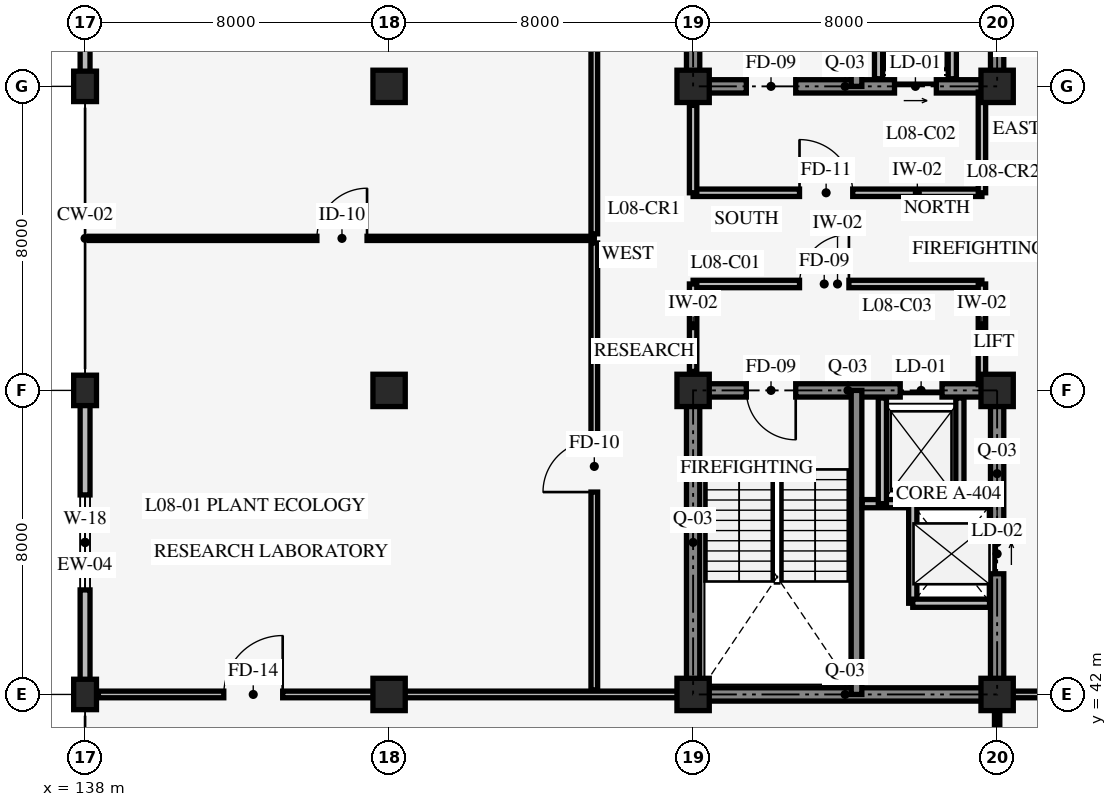
"""IFC4 building model, lengths in metres.
Left out: names, types, materials, properties, quantities, classifications, styles, units other than length and angle.
Written with IfcOpenShell. Run it as: python <this file> out.ifc"""

import sys

from ifc_helpers import new_model, si_unit, direction, frame, frame_2d, origin, origin_2d, place, context, subcontext, project, spatial, rectangle, extrude, element, fill, save


model = new_model("IFC4")
c1 = context("Model", 3, precision=1e-05, world=origin(), true_north=direction((0.0, 1.0)))
c2 = subcontext(c1, "Body", "Model", "MODEL_VIEW")
j1 = project(units=[si_unit("LENGTHUNIT", "METRE"), si_unit("PLANEANGLEUNIT", "RADIAN")], contexts=[c1])
p1 = place(None, origin())
s1 = spatial("IfcSite", under=j1, at=p1, CompositionType="ELEMENT")
p2 = place(p1, origin())
s2 = spatial("IfcBuilding", under=s1, at=p2, CompositionType="ELEMENT")
p3 = place(p2, frame((0.0, 0.0, 31.8)))
s3 = spatial("IfcBuildingStorey", under=s2, at=p3, CompositionType="ELEMENT", Elevation=31.8)
p4 = place(p3, frame((154.0, 42.0, 0.0), z_axis=(0.0, 0.0, 1.0), x_axis=(1.0, 0.0, 0.0)))
e1 = element("IfcWall", 1, at=p4, inside=s3, PredefinedType="SHEAR", context=c2, shape_type="SweptSolid", body=[
    extrude(rectangle(XDim=8.0, YDim=0.35, at=frame_2d((4.0, 0.0))), origin(), (0.0, 0.0, 1.0), 3.95),
])
p5 = place(p3, frame((162.0, 42.0, 0.0), z_axis=(0.0, 0.0, 1.0), x_axis=(0.0, 1.0, 0.0)))
e2 = element("IfcWall", 2, at=p5, inside=s3, PredefinedType="SHEAR", context=c2, shape_type="SweptSolid", body=[
    extrude(rectangle(XDim=8.0, YDim=0.35, at=frame_2d((4.0, 0.0))), origin(), (0.0, 0.0, 1.0), 3.95),
])
p6 = place(p5, frame((3.175, 0.0, 0.0)))
e3 = element("IfcOpeningElement", 3, at=p6, cuts=e2, PredefinedType="OPENING", context=c2, shape_type="SweptSolid", body=[
    extrude(rectangle(XDim=1.05, YDim=2.2, at=frame_2d((0.525, 1.1))), frame((0.0, 0.185, 0.0), z_axis=(0.0, -1.0, 0.0), x_axis=(1.0, 0.0, 0.0)), (0.0, 0.0, 1.0), 0.37),
])
p7 = place(p3, frame((162.0, 50.0, 0.0), z_axis=(0.0, 0.0, 1.0), x_axis=(-1.0, 0.0, 0.0)))
e4 = element("IfcWall", 4, at=p7, inside=s3, PredefinedType="SHEAR", context=c2, shape_type="SweptSolid", body=[
    extrude(rectangle(XDim=8.0, YDim=0.35, at=frame_2d((4.0, 0.0))), origin(), (0.0, 0.0, 1.0), 3.95),
])
p8 = place(p7, frame((5.3, 0.0, 0.0)))
e5 = element("IfcOpeningElement", 5, at=p8, cuts=e4, PredefinedType="OPENING", context=c2, shape_type="SweptSolid", body=[
    extrude(rectangle(XDim=1.3, YDim=2.15, at=frame_2d((0.65, 1.075))), frame((0.0, 0.185, 0.0), z_axis=(0.0, -1.0, 0.0), x_axis=(1.0, 0.0, 0.0)), (0.0, 0.0, 1.0), 0.37),
])
p9 = place(p7, frame((1.45, 0.0, 0.0)))
e6 = element("IfcOpeningElement", 6, at=p9, cuts=e4, PredefinedType="OPENING", context=c2, shape_type="SweptSolid", body=[
    extrude(rectangle(XDim=1.1, YDim=2.2, at=frame_2d((0.55, 1.1))), frame((0.0, 0.185, 0.0), z_axis=(0.0, -1.0, 0.0), x_axis=(1.0, 0.0, 0.0)), (0.0, 0.0, 1.0), 0.37),
])
p10 = place(p3, frame((154.0, 50.0, 0.0), z_axis=(0.0, 0.0, 1.0), x_axis=(0.0, -1.0, 0.0)))
e7 = element("IfcWall", 7, at=p10, inside=s3, PredefinedType="SHEAR", context=c2, shape_type="SweptSolid", body=[
    extrude(rectangle(XDim=8.0, YDim=0.35, at=frame_2d((4.0, 0.0))), origin(), (0.0, 0.0, 1.0), 3.95),
])
p11 = place(p3, frame((158.3, 42.0, 0.0), z_axis=(0.0, 0.0, 1.0), x_axis=(0.0, 1.0, 0.0)))
e8 = element("IfcWall", 8, at=p11, inside=s3, PredefinedType="SHEAR", context=c2, shape_type="SweptSolid", body=[
    extrude(rectangle(XDim=8.0, YDim=0.28, at=frame_2d((4.0, 0.0))), origin(), (0.0, 0.0, 1.0), 3.95),
])
p12 = place(p3, frame((154.0, 58.0, 0.0), z_axis=(0.0, 0.0, 1.0), x_axis=(1.0, 0.0, 0.0)))
e9 = element("IfcWall", 9, at=p12, inside=s3, PredefinedType="SHEAR", context=c2, shape_type="SweptSolid", body=[
    extrude(rectangle(XDim=8.0, YDim=0.35, at=frame_2d((4.0, 0.0))), origin(), (0.0, 0.0, 1.0), 3.95),
])
p13 = place(p12, frame((1.4, 0.0, 0.0)))
e10 = element("IfcOpeningElement", 10, at=p13, cuts=e9, PredefinedType="OPENING", context=c2, shape_type="SweptSolid", body=[
    extrude(rectangle(XDim=1.3, YDim=2.15, at=frame_2d((0.65, 1.075))), frame((0.0, 0.185, 0.0), z_axis=(0.0, -1.0, 0.0), x_axis=(1.0, 0.0, 0.0)), (0.0, 0.0, 1.0), 0.37),
])
p14 = place(p12, frame((5.3, 0.0, 0.0)))
e11 = element("IfcOpeningElement", 11, at=p14, cuts=e9, PredefinedType="OPENING", context=c2, shape_type="SweptSolid", body=[
    extrude(rectangle(XDim=1.1, YDim=2.2, at=frame_2d((0.55, 1.1))), frame((0.0, 0.185, 0.0), z_axis=(0.0, -1.0, 0.0), x_axis=(1.0, 0.0, 0.0)), (0.0, 0.0, 1.0), 0.37),
])
p15 = place(p3, frame((162.0, 58.0, 0.0), z_axis=(0.0, 0.0, 1.0), x_axis=(0.0, 1.0, 0.0)))
e12 = element("IfcWall", 12, at=p15, inside=s3, PredefinedType="SHEAR", context=c2, shape_type="SweptSolid", body=[
    extrude(rectangle(XDim=8.0, YDim=0.35, at=frame_2d((4.0, 0.0))), origin(), (0.0, 0.0, 1.0), 3.95),
])
p16 = place(p15, frame((3.275, 0.0, 0.0)))
e13 = element("IfcOpeningElement", 13, at=p16, cuts=e12, PredefinedType="OPENING", context=c2, shape_type="SweptSolid", body=[
    extrude(rectangle(XDim=1.05, YDim=2.2, at=frame_2d((0.525, 1.1))), frame((0.0, 0.185, 0.0), z_axis=(0.0, -1.0, 0.0), x_axis=(1.0, 0.0, 0.0)), (0.0, 0.0, 1.0), 0.37),
])
p17 = place(p15, frame((5.45, 0.0, 0.0)))
e14 = element("IfcOpeningElement", 14, at=p17, cuts=e12, PredefinedType="OPENING", context=c2, shape_type="SweptSolid", body=[
    extrude(rectangle(XDim=1.4, YDim=2.3, at=frame_2d((0.7, 1.15))), frame((0.0, 0.185, 0.0), z_axis=(0.0, -1.0, 0.0), x_axis=(1.0, 0.0, 0.0)), (0.0, 0.0, 1.0), 0.37),
])
p18 = place(p3, frame((154.0, 66.0, 0.0), z_axis=(0.0, 0.0, 1.0), x_axis=(0.0, -1.0, 0.0)))
e15 = element("IfcWall", 15, at=p18, inside=s3, PredefinedType="SHEAR", context=c2, shape_type="SweptSolid", body=[
    extrude(rectangle(XDim=8.0, YDim=0.35, at=frame_2d((4.0, 0.0))), origin(), (0.0, 0.0, 1.0), 3.95),
])
p19 = place(p3, frame((158.3, 58.0, 0.0), z_axis=(0.0, 0.0, 1.0), x_axis=(0.0, 1.0, 0.0)))
e16 = element("IfcWall", 16, at=p19, inside=s3, PredefinedType="SHEAR", context=c2, shape_type="SweptSolid", body=[
    extrude(rectangle(XDim=8.0, YDim=0.28, at=frame_2d((4.0, 0.0))), origin(), (0.0, 0.0, 1.0), 3.95),
])
for number, where, z_axis, x_axis in (
    (17, (138.0, 42.0, 0.0), (0.0, 0.0, 1.0), (1.0, 0.0, 0.0)),
    (18, (138.0, 50.0, 0.0), (0.0, 0.0, 1.0), (1.0, 0.0, 0.0)),
    (19, (138.0, 58.0, 0.0), (0.0, 0.0, 1.0), (1.0, 0.0, 0.0)),
):
    element("IfcColumn", number, at=place(p3, frame(where, z_axis=z_axis, x_axis=x_axis)), inside=s3, PredefinedType="COLUMN", context=c2, shape_type="SweptSolid", body=[
        extrude(rectangle(XDim=0.6, YDim=0.8, at=origin_2d()), origin(), (0.0, 0.0, 1.0), 4.2),
    ])
for number, where, z_axis, x_axis in (
    (20, (146.0, 42.0, 0.0), (0.0, 0.0, 1.0), (1.0, 0.0, 0.0)),
    (21, (146.0, 50.0, 0.0), (0.0, 0.0, 1.0), (1.0, 0.0, 0.0)),
    (22, (146.0, 58.0, 0.0), (0.0, 0.0, 1.0), (1.0, 0.0, 0.0)),
    (23, (154.0, 42.0, 0.0), (0.0, 0.0, 1.0), (1.0, 0.0, 0.0)),
    (24, (154.0, 50.0, 0.0), (0.0, 0.0, 1.0), (1.0, 0.0, 0.0)),
    (25, (154.0, 58.0, 0.0), (0.0, 0.0, 1.0), (1.0, 0.0, 0.0)),
    (26, (162.0, 42.0, 0.0), (0.0, 0.0, 1.0), (1.0, 0.0, 0.0)),
    (27, (162.0, 50.0, 0.0), (0.0, 0.0, 1.0), (1.0, 0.0, 0.0)),
    (28, (162.0, 58.0, 0.0), (0.0, 0.0, 1.0), (1.0, 0.0, 0.0)),
):
    element("IfcColumn", number, at=place(p3, frame(where, z_axis=z_axis, x_axis=x_axis)), inside=s3, PredefinedType="COLUMN", context=c2, shape_type="SweptSolid", body=[
        extrude(rectangle(XDim=0.85, YDim=0.85, at=origin_2d()), origin(), (0.0, 0.0, 1.0), 4.2),
    ])
p20 = place(p3, frame((138.0, 42.0, 0.0), z_axis=(0.0, 0.0, 1.0), x_axis=(0.0, 1.0, 0.0)))
e29 = element("IfcWall", 29, at=p20, inside=s3, PredefinedType="STANDARD", context=c2, shape_type="SweptSolid", body=[
    extrude(rectangle(XDim=8.0, YDim=0.26, at=frame_2d((4.0, 0.0))), origin(), (0.0, 0.0, 1.0), 3.31),
])
p21 = place(p20, frame((2.75, 0.0, 0.85)))
e30 = element("IfcOpeningElement", 30, at=p21, cuts=e29, PredefinedType="OPENING", context=c2, shape_type="SweptSolid", body=[
    extrude(rectangle(XDim=2.5, YDim=1.8, at=frame_2d((1.25, 0.9))), frame((0.0, 0.14, 0.0), z_axis=(0.0, -1.0, 0.0), x_axis=(1.0, 0.0, 0.0)), (0.0, 0.0, 1.0), 0.28),
])
p22 = place(p3, frame((138.0, 58.0, 0.0), z_axis=(0.0, 0.0, 1.0), x_axis=(0.0, 1.0, 0.0)))
e31 = element("IfcWall", 31, at=p22, inside=s3, PredefinedType="STANDARD", context=c2, shape_type="SweptSolid", body=[
    extrude(rectangle(XDim=8.0, YDim=0.26, at=frame_2d((4.0, 0.0))), origin(), (0.0, 0.0, 1.0), 3.31),
])
p23 = place(p22, frame((2.85, 0.0, 0.85)))
e32 = element("IfcOpeningElement", 32, at=p23, cuts=e31, PredefinedType="OPENING", context=c2, shape_type="SweptSolid", body=[
    extrude(rectangle(XDim=2.3, YDim=1.5, at=frame_2d((1.15, 0.75))), frame((0.0, 0.14, 0.0), z_axis=(0.0, -1.0, 0.0), x_axis=(1.0, 0.0, 0.0)), (0.0, 0.0, 1.0), 0.28),
])
p24 = place(p3, frame((158.45, 47.02, 0.0), z_axis=(0.0, 0.0, 1.0), x_axis=(1.0, 0.0, 0.0)))
e33 = element("IfcWall", 33, at=p24, inside=s3, PredefinedType="STANDARD", context=c2, shape_type="SweptSolid", body=[
    extrude(rectangle(XDim=3.35, YDim=0.215, at=frame_2d((1.675, 0.0))), origin(), (0.0, 0.0, 1.0), 3.9),
])
for number, where, z_axis, x_axis in (
    (34, (158.98, 47.02, 0.0), (0.0, 0.0, 1.0), (0.0, 1.0, 0.0)),
    (35, (161.02, 47.02, 0.0), (0.0, 0.0, 1.0), (0.0, 1.0, 0.0)),
):
    element("IfcWall", number, at=place(p3, frame(where, z_axis=z_axis, x_axis=x_axis)), inside=s3, PredefinedType="STANDARD", context=c2, shape_type="SweptSolid", body=[
        extrude(rectangle(XDim=2.78, YDim=0.215, at=frame_2d((1.39, 0.0))), origin(), (0.0, 0.0, 1.0), 3.9),
    ])
p25 = place(p3, frame((159.78, 44.4, 0.0), z_axis=(0.0, 0.0, 1.0), x_axis=(0.0, 1.0, 0.0)))
e36 = element("IfcWall", 36, at=p25, inside=s3, PredefinedType="STANDARD", context=c2, shape_type="SweptSolid", body=[
    extrude(rectangle(XDim=2.62, YDim=0.215, at=frame_2d((1.31, 0.0))), origin(), (0.0, 0.0, 1.0), 3.9),
])
p26 = place(p3, frame((159.78, 44.4, 0.0), z_axis=(0.0, 0.0, 1.0), x_axis=(1.0, 0.0, 0.0)))
e37 = element("IfcWall", 37, at=p26, inside=s3, PredefinedType="STANDARD", context=c2, shape_type="SweptSolid", body=[
    extrude(rectangle(XDim=2.02, YDim=0.215, at=frame_2d((1.01, 0.0))), origin(), (0.0, 0.0, 1.0), 3.9),
])
for number, where, z_axis, x_axis in (
    (38, (160.82, 58.2, 0.0), (0.0, 0.0, 1.0), (0.0, 1.0, 0.0)),
    (39, (158.88, 58.2, 0.0), (0.0, 0.0, 1.0), (0.0, 1.0, 0.0)),
):
    element("IfcWall", number, at=place(p3, frame(where, z_axis=z_axis, x_axis=x_axis)), inside=s3, PredefinedType="STANDARD", context=c2, shape_type="SweptSolid", body=[
        extrude(rectangle(XDim=2.55, YDim=0.215, at=frame_2d((1.275, 0.0))), origin(), (0.0, 0.0, 1.0), 3.9),
    ])
p27 = place(p3, frame((154.0, 52.8, 0.0), z_axis=(0.0, 0.0, 1.0), x_axis=(1.0, 0.0, 0.0)))
e40 = element("IfcWall", 40, at=p27, inside=s3, PredefinedType="STANDARD", context=c2, shape_type="SweptSolid", body=[
    extrude(rectangle(XDim=7.6, YDim=0.195, at=frame_2d((3.8, 0.0))), origin(), (0.0, 0.0, 1.0), 3.9),
])
p28 = place(p27, frame((2.8, 0.0, 0.0)))
e41 = element("IfcOpeningElement", 41, at=p28, cuts=e40, PredefinedType="OPENING", context=c2, shape_type="SweptSolid", body=[
    extrude(rectangle(XDim=1.3, YDim=2.15, at=frame_2d((0.65, 1.075))), frame((0.0, 0.107, 0.0), z_axis=(0.0, -1.0, 0.0), x_axis=(1.0, 0.0, 0.0)), (0.0, 0.0, 1.0), 0.215),
])
p29 = place(p3, frame((161.6, 50.15, 0.0), z_axis=(0.0, 0.0, 1.0), x_axis=(0.0, 1.0, 0.0)))
e42 = element("IfcWall", 42, at=p29, inside=s3, PredefinedType="STANDARD", context=c2, shape_type="SweptSolid", body=[
    extrude(rectangle(XDim=2.65, YDim=0.195, at=frame_2d((1.325, 0.0))), origin(), (0.0, 0.0, 1.0), 3.31),
])
p30 = place(p3, frame((154.0, 50.5, 0.0), z_axis=(0.0, 0.0, 1.0), x_axis=(0.0, 1.0, 0.0)))
e43 = element("IfcWall", 43, at=p30, inside=s3, PredefinedType="STANDARD", context=c2, shape_type="SweptSolid", body=[
    extrude(rectangle(XDim=2.3, YDim=0.195, at=frame_2d((1.15, 0.0))), origin(), (0.0, 0.0, 1.0), 3.31),
])
p31 = place(p3, frame((154.0, 55.2, 0.0), z_axis=(0.0, 0.0, 1.0), x_axis=(1.0, 0.0, 0.0)))
e44 = element("IfcWall", 44, at=p31, inside=s3, PredefinedType="STANDARD", context=c2, shape_type="SweptSolid", body=[
    extrude(rectangle(XDim=7.6, YDim=0.195, at=frame_2d((3.8, 0.0))), origin(), (0.0, 0.0, 1.0), 3.9),
])
p32 = place(p31, frame((2.8, 0.0, 0.0)))
e45 = element("IfcOpeningElement", 45, at=p32, cuts=e44, PredefinedType="OPENING", context=c2, shape_type="SweptSolid", body=[
    extrude(rectangle(XDim=1.4, YDim=2.2, at=frame_2d((0.7, 1.1))), frame((0.0, 0.107, 0.0), z_axis=(0.0, -1.0, 0.0), x_axis=(1.0, 0.0, 0.0)), (0.0, 0.0, 1.0), 0.215),
])
p33 = place(p3, frame((161.6, 55.2, 0.0), z_axis=(0.0, 0.0, 1.0), x_axis=(0.0, 1.0, 0.0)))
e46 = element("IfcWall", 46, at=p33, inside=s3, PredefinedType="STANDARD", context=c2, shape_type="SweptSolid", body=[
    extrude(rectangle(XDim=2.65, YDim=0.195, at=frame_2d((1.325, 0.0))), origin(), (0.0, 0.0, 1.0), 3.31),
])
p34 = place(p3, frame((154.0, 55.2, 0.0), z_axis=(0.0, 0.0, 1.0), x_axis=(0.0, 1.0, 0.0)))
e47 = element("IfcWall", 47, at=p34, inside=s3, PredefinedType="STANDARD", context=c2, shape_type="SweptSolid", body=[
    extrude(rectangle(XDim=2.3, YDim=0.195, at=frame_2d((1.15, 0.0))), origin(), (0.0, 0.0, 1.0), 3.31),
])
p35 = place(p3, frame((151.4, 42.12, 0.0), z_axis=(0.0, 0.0, 1.0), x_axis=(0.0, 1.0, 0.0)))
e48 = element("IfcWall", 48, at=p35, inside=s3, PredefinedType="STANDARD", context=c2, shape_type="SweptSolid", body=[
    extrude(rectangle(XDim=11.76, YDim=0.175, at=frame_2d((5.88, 0.0))), origin(), (0.0, 0.0, 1.0), 3.9),
])
p36 = place(p35, frame((5.205, 0.0, 0.0)))
e49 = element("IfcOpeningElement", 49, at=p36, cuts=e48, PredefinedType="OPENING", context=c2, shape_type="SweptSolid", body=[
    extrude(rectangle(XDim=1.35, YDim=2.15, at=frame_2d((0.675, 1.075))), frame((0.0, 0.098, 0.0), z_axis=(0.0, -1.0, 0.0), x_axis=(1.0, 0.0, 0.0)), (0.0, 0.0, 1.0), 0.195),
])
p37 = place(p3, frame((138.12, 54.0, 0.0), z_axis=(0.0, 0.0, 1.0), x_axis=(1.0, 0.0, 0.0)))
e50 = element("IfcWall", 50, at=p37, inside=s3, PredefinedType="STANDARD", context=c2, shape_type="SweptSolid", body=[
    extrude(rectangle(XDim=13.28, YDim=0.11, at=frame_2d((6.64, 0.0))), origin(), (0.0, 0.0, 1.0), 3.9),
])
p38 = place(p37, frame((5.98, 0.0, 0.0)))
e51 = element("IfcOpeningElement", 51, at=p38, cuts=e50, PredefinedType="OPENING", context=c2, shape_type="SweptSolid", body=[
    extrude(rectangle(XDim=1.32, YDim=2.16, at=frame_2d((0.66, 1.08))), frame((0.0, 0.065, 0.0), z_axis=(0.0, -1.0, 0.0), x_axis=(1.0, 0.0, 0.0)), (0.0, 0.0, 1.0), 0.13),
])
p39 = place(p3, frame((151.4, 54.12, 0.0), z_axis=(0.0, 0.0, 1.0), x_axis=(0.0, 1.0, 0.0)))
e52 = element("IfcWall", 52, at=p39, inside=s3, PredefinedType="STANDARD", context=c2, shape_type="SweptSolid", body=[
    extrude(rectangle(XDim=11.76, YDim=0.175, at=frame_2d((5.88, 0.0))), origin(), (0.0, 0.0, 1.0), 3.9),
])
p40 = place(p39, frame((5.18, 0.0, 0.0)))
e53 = element("IfcOpeningElement", 53, at=p40, cuts=e52, PredefinedType="OPENING", context=c2, shape_type="SweptSolid", body=[
    extrude(rectangle(XDim=1.4, YDim=2.2, at=frame_2d((0.7, 1.1))), frame((0.0, 0.098, 0.0), z_axis=(0.0, -1.0, 0.0), x_axis=(1.0, 0.0, 0.0)), (0.0, 0.0, 1.0), 0.195),
])
p41 = place(p3, frame((138.35, 42.0, 0.0), z_axis=(0.0, 0.0, 1.0), x_axis=(1.0, 0.0, 0.0)))
e54 = element("IfcWall", 54, at=p41, inside=s3, PredefinedType="STANDARD", context=c2, shape_type="SweptSolid", body=[
    extrude(rectangle(XDim=15.3, YDim=0.175, at=frame_2d((7.65, 0.0))), origin(), (0.0, 0.0, 1.0), 3.26),
])
p42 = place(p41, frame((3.3, 0.0, 0.0)))
e55 = element("IfcOpeningElement", 55, at=p42, cuts=e54, PredefinedType="OPENING", context=c2, shape_type="SweptSolid", body=[
    extrude(rectangle(XDim=1.55, YDim=2.25, at=frame_2d((0.775, 1.125))), frame((0.0, 0.098, 0.0), z_axis=(0.0, -1.0, 0.0), x_axis=(1.0, 0.0, 0.0)), (0.0, 0.0, 1.0), 0.195),
])
p43 = place(p3, frame((162.0, 34.05, 0.0), z_axis=(0.0, 0.0, 1.0), x_axis=(0.0, 1.0, 0.0)))
e56 = element("IfcWall", 56, at=p43, inside=s3, PredefinedType="STANDARD", context=c2, shape_type="SweptSolid", body=[
    extrude(rectangle(XDim=7.83, YDim=0.14, at=frame_2d((3.915, 0.0))), origin(), (0.0, 0.0, 1.0), 3.31),
])
p44 = place(p43, frame((3.0, 0.0, 0.0)))
e57 = element("IfcOpeningElement", 57, at=p44, cuts=e56, PredefinedType="OPENING", context=c2, shape_type="SweptSolid", body=[
    extrude(rectangle(XDim=1.06, YDim=2.12, at=frame_2d((0.53, 1.06))), frame((0.0, 0.08, 0.0), z_axis=(0.0, -1.0, 0.0), x_axis=(1.0, 0.0, 0.0)), (0.0, 0.0, 1.0), 0.16),
])
p45 = place(p3, frame((162.35, 42.0, 0.0), z_axis=(0.0, 0.0, 1.0), x_axis=(1.0, 0.0, 0.0)))
e58 = element("IfcWall", 58, at=p45, inside=s3, PredefinedType="STANDARD", context=c2, shape_type="SweptSolid", body=[
    extrude(rectangle(XDim=14.7, YDim=0.175, at=frame_2d((7.35, 0.0))), origin(), (0.0, 0.0, 1.0), 3.26),
])
p46 = place(p45, frame((2.75, 0.0, 0.0)))
e59 = element("IfcOpeningElement", 59, at=p46, cuts=e58, PredefinedType="OPENING", context=c2, shape_type="SweptSolid", body=[
    extrude(rectangle(XDim=1.6, YDim=2.25, at=frame_2d((0.8, 1.125))), frame((0.0, 0.098, 0.0), z_axis=(0.0, -1.0, 0.0), x_axis=(1.0, 0.0, 0.0)), (0.0, 0.0, 1.0), 0.195),
])
p47 = place(p21, origin())
e60 = element("IfcWindow", 60, at=p47, inside=s3, PartitioningType="SINGLE_PANEL", PredefinedType="WINDOW", context=c2, shape_type="SweptSolid", body=[
    extrude(rectangle(XDim=2.5, YDim=1.8, at=frame_2d((1.25, 0.9))), frame((0.0, 0.03, 0.0), z_axis=(0.0, -1.0, 0.0), x_axis=(1.0, 0.0, 0.0)), (0.0, 0.0, 1.0), 0.06),
])
fill(e30, e60)
p48 = place(p8, origin())
e61 = element("IfcDoor", 61, at=p48, inside=s3, OperationType="SINGLE_SWING_LEFT", PredefinedType="DOOR", context=c2, shape_type="SweptSolid", body=[
    extrude(rectangle(XDim=1.3, YDim=2.15, at=frame_2d((0.65, 1.075))), frame((0.0, 0.025, 0.0), z_axis=(0.0, -1.0, 0.0), x_axis=(1.0, 0.0, 0.0)), (0.0, 0.0, 1.0), 0.05),
])
fill(e5, e61)
p49 = place(p9, origin())
e62 = element("IfcDoor", 62, at=p49, inside=s3, OperationType="SLIDING_TO_LEFT", PredefinedType="DOOR", context=c2, shape_type="SweptSolid", body=[
    extrude(rectangle(XDim=1.1, YDim=2.2, at=frame_2d((0.55, 1.1))), frame((0.0, 0.025, 0.0), z_axis=(0.0, -1.0, 0.0), x_axis=(1.0, 0.0, 0.0)), (0.0, 0.0, 1.0), 0.05),
])
fill(e6, e62)
p50 = place(p6, origin())
e63 = element("IfcDoor", 63, at=p50, inside=s3, OperationType="SLIDING_TO_LEFT", PredefinedType="DOOR", context=c2, shape_type="SweptSolid", body=[
    extrude(rectangle(XDim=1.05, YDim=2.2, at=frame_2d((0.525, 1.1))), frame((0.0, 0.025, 0.0), z_axis=(0.0, -1.0, 0.0), x_axis=(1.0, 0.0, 0.0)), (0.0, 0.0, 1.0), 0.05),
])
fill(e3, e63)
p51 = place(p13, origin())
e64 = element("IfcDoor", 64, at=p51, inside=s3, OperationType="SINGLE_SWING_RIGHT", PredefinedType="DOOR", context=c2, shape_type="SweptSolid", body=[
    extrude(rectangle(XDim=1.3, YDim=2.15, at=frame_2d((0.65, 1.075))), frame((0.0, 0.025, 0.0), z_axis=(0.0, -1.0, 0.0), x_axis=(1.0, 0.0, 0.0)), (0.0, 0.0, 1.0), 0.05),
])
fill(e10, e64)
p52 = place(p14, origin())
e65 = element("IfcDoor", 65, at=p52, inside=s3, OperationType="SLIDING_TO_RIGHT", PredefinedType="DOOR", context=c2, shape_type="SweptSolid", body=[
    extrude(rectangle(XDim=1.1, YDim=2.2, at=frame_2d((0.55, 1.1))), frame((0.0, 0.025, 0.0), z_axis=(0.0, -1.0, 0.0), x_axis=(1.0, 0.0, 0.0)), (0.0, 0.0, 1.0), 0.05),
])
fill(e11, e65)
p53 = place(p28, origin())
e66 = element("IfcDoor", 66, at=p53, inside=s3, OperationType="SINGLE_SWING_RIGHT", PredefinedType="DOOR", context=c2, shape_type="SweptSolid", body=[
    extrude(rectangle(XDim=1.3, YDim=2.15, at=frame_2d((0.65, 1.075))), frame((0.0, 0.025, 0.0), z_axis=(0.0, -1.0, 0.0), x_axis=(1.0, 0.0, 0.0)), (0.0, 0.0, 1.0), 0.05),
])
fill(e41, e66)
p54 = place(p32, origin())
e67 = element("IfcDoor", 67, at=p54, inside=s3, OperationType="SINGLE_SWING_LEFT", PredefinedType="DOOR", context=c2, shape_type="SweptSolid", body=[
    extrude(rectangle(XDim=1.4, YDim=2.2, at=frame_2d((0.7, 1.1))), frame((0.0, 0.025, 0.0), z_axis=(0.0, -1.0, 0.0), x_axis=(1.0, 0.0, 0.0)), (0.0, 0.0, 1.0), 0.05),
])
fill(e45, e67)
p55 = place(p36, origin())
e68 = element("IfcDoor", 68, at=p55, inside=s3, OperationType="SINGLE_SWING_LEFT", PredefinedType="DOOR", context=c2, shape_type="SweptSolid", body=[
    extrude(rectangle(XDim=1.35, YDim=2.15, at=frame_2d((0.675, 1.075))), frame((0.0, 0.025, 0.0), z_axis=(0.0, -1.0, 0.0), x_axis=(1.0, 0.0, 0.0)), (0.0, 0.0, 1.0), 0.05),
])
fill(e49, e68)
p56 = place(p38, origin())
e69 = element("IfcDoor", 69, at=p56, inside=s3, OperationType="SINGLE_SWING_RIGHT", PredefinedType="DOOR", context=c2, shape_type="SweptSolid", body=[
    extrude(rectangle(XDim=1.32, YDim=2.16, at=frame_2d((0.66, 1.08))), frame((0.0, 0.025, 0.0), z_axis=(0.0, -1.0, 0.0), x_axis=(1.0, 0.0, 0.0)), (0.0, 0.0, 1.0), 0.05),
])
fill(e51, e69)
p57 = place(p42, origin())
e70 = element("IfcDoor", 70, at=p57, inside=s3, OperationType="SINGLE_SWING_RIGHT", PredefinedType="DOOR", context=c2, shape_type="SweptSolid", body=[
    extrude(rectangle(XDim=1.55, YDim=2.25, at=frame_2d((0.775, 1.125))), frame((0.0, 0.025, 0.0), z_axis=(0.0, -1.0, 0.0), x_axis=(1.0, 0.0, 0.0)), (0.0, 0.0, 1.0), 0.05),
])
fill(e55, e70)
save(model, sys.argv[1])
